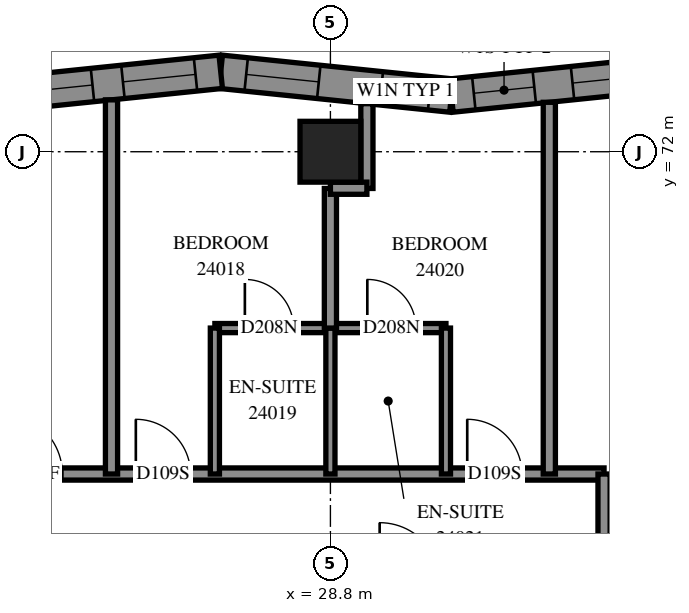
"""IFC4 building model, lengths in metres.
Left out: names, types, materials, properties, quantities, classifications, styles, units other than length and angle.
Written with IfcOpenShell. Run it as: python <this file> out.ifc"""

import sys

from ifc_helpers import new_model, si_unit, direction, frame, frame_2d, origin, origin_2d, place, context, subcontext, project, spatial, polyline, rectangle, outline, extrude, element, fill, save


model = new_model("IFC4")
c1 = context("Model", 3, precision=1e-05, world=origin(), true_north=direction((0.0, 1.0)))
c2 = subcontext(c1, "Body", "Model", "MODEL_VIEW")
j1 = project(units=[si_unit("LENGTHUNIT", "METRE"), si_unit("PLANEANGLEUNIT", "RADIAN")], contexts=[c1])
p1 = place(None, origin())
s1 = spatial("IfcSite", under=j1, at=p1, CompositionType="ELEMENT")
p2 = place(p1, origin())
s2 = spatial("IfcBuilding", under=s1, at=p2, CompositionType="ELEMENT")
p3 = place(p2, frame((0.0, 0.0, 91.4)))
s3 = spatial("IfcBuildingStorey", under=s2, at=p3, CompositionType="ELEMENT", Elevation=91.4)
p4 = place(p3, frame((28.8, 72.0, 0.0), z_axis=(0.0, 0.0, 1.0), x_axis=(1.0, 0.0, 0.0)))
e1 = element("IfcColumn", 1, at=p4, inside=s3, PredefinedType="COLUMN", context=c2, shape_type="SweptSolid", body=[
    extrude(rectangle(XDim=1.0, YDim=1.0, at=origin_2d()), origin(), (0.0, 0.0, 1.0), 3.1),
])
p5 = place(p3, frame((34.584, 73.314, 0.0), z_axis=(0.0, 0.0, 1.0), x_axis=(-0.9947304076, -0.1025251975, 0.0)))
e2 = element("IfcWall", 2, at=p5, inside=s3, PredefinedType="SOLIDWALL", context=c2, shape_type="SweptSolid", body=[
    extrude(outline(polyline([(-0.028, -0.275), (3.785, -0.275), (3.842, 0.275), (0.028, 0.275), (-0.028, -0.275)])), origin(), (0.0, 0.0, 1.0), 3.1),
])
p6 = place(p5, frame((0.612, 0.0, 0.5)))
e3 = element("IfcOpeningElement", 3, at=p6, cuts=e2, PredefinedType="OPENING", context=c2, shape_type="SweptSolid", body=[
    extrude(rectangle(XDim=1.2, YDim=2.45, at=frame_2d((0.6, 1.225))), frame((0.0, 0.285, 0.0), z_axis=(0.0, -1.0, 0.0), x_axis=(1.0, 0.0, 0.0)), (0.0, 0.0, 1.0), 0.57),
])
p7 = place(p5, frame((2.444, 0.0, 0.45)))
e4 = element("IfcOpeningElement", 4, at=p7, cuts=e2, PredefinedType="OPENING", context=c2, shape_type="SweptSolid", body=[
    extrude(rectangle(XDim=1.0, YDim=2.5, at=frame_2d((0.5, 1.25))), frame((0.0, 0.285, 0.0), z_axis=(0.0, -1.0, 0.0), x_axis=(1.0, 0.0, 0.0)), (0.0, 0.0, 1.0), 0.57),
])
p8 = place(p3, frame((30.79, 72.924, 0.0), z_axis=(0.0, 0.0, 1.0), x_axis=(-0.9947306832, 0.1025225234, 0.0)))
e5 = element("IfcWall", 5, at=p8, inside=s3, PredefinedType="SOLIDWALL", context=c2, shape_type="SweptSolid", body=[
    extrude(outline(polyline([(0.028, -0.275), (3.842, -0.275), (3.785, 0.275), (-0.028, 0.275), (0.028, -0.275)])), origin(), (0.0, 0.0, 1.0), 3.1),
])
p9 = place(p8, frame((2.193, 0.0, 0.5)))
e6 = element("IfcOpeningElement", 6, at=p9, cuts=e5, PredefinedType="OPENING", context=c2, shape_type="SweptSolid", body=[
    extrude(rectangle(XDim=1.2, YDim=2.45, at=frame_2d((0.6, 1.225))), frame((0.0, 0.285, 0.0), z_axis=(0.0, -1.0, 0.0), x_axis=(1.0, 0.0, 0.0)), (0.0, 0.0, 1.0), 0.57),
])
p10 = place(p8, frame((0.359, 0.0, 0.45)))
e7 = element("IfcOpeningElement", 7, at=p10, cuts=e5, PredefinedType="OPENING", context=c2, shape_type="SweptSolid", body=[
    extrude(rectangle(XDim=0.8, YDim=2.5, at=frame_2d((0.4, 1.25))), frame((0.0, 0.285, 0.0), z_axis=(0.0, -1.0, 0.0), x_axis=(1.0, 0.0, 0.0)), (0.0, 0.0, 1.0), 0.57),
])
p11 = place(p3, frame((26.996, 73.314, 0.0), z_axis=(0.0, 0.0, 1.0), x_axis=(-0.9947305582, -0.1025237367, 0.0)))
e8 = element("IfcWall", 8, at=p11, inside=s3, PredefinedType="SOLIDWALL", context=c2, shape_type="SweptSolid", body=[
    extrude(outline(polyline([(-0.028, -0.275), (3.785, -0.275), (3.885, 0.275), (0.028, 0.275), (-0.028, -0.275)])), origin(), (0.0, 0.0, 1.0), 3.1),
])
p12 = place(p11, frame((0.417, 0.0, 0.5)))
e9 = element("IfcOpeningElement", 9, at=p12, cuts=e8, PredefinedType="OPENING", context=c2, shape_type="SweptSolid", body=[
    extrude(rectangle(XDim=1.2, YDim=2.45, at=frame_2d((0.6, 1.225))), frame((0.0, 0.285, 0.0), z_axis=(0.0, -1.0, 0.0), x_axis=(1.0, 0.0, 0.0)), (0.0, 0.0, 1.0), 0.57),
])
p13 = place(p11, frame((2.12, 0.0, 0.5)))
e10 = element("IfcOpeningElement", 10, at=p13, cuts=e8, PredefinedType="OPENING", context=c2, shape_type="SweptSolid", body=[
    extrude(rectangle(XDim=1.2, YDim=2.45, at=frame_2d((0.6, 1.225))), frame((0.0, 0.285, 0.0), z_axis=(0.0, -1.0, 0.0), x_axis=(1.0, 0.0, 0.0)), (0.0, 0.0, 1.0), 0.57),
])
p14 = place(p3, frame((21.602, 66.7, 0.0), z_axis=(0.0, 0.0, 1.0), x_axis=(1.0, 0.0, 0.0)))
e11 = element("IfcWall", 11, at=p14, inside=s3, PredefinedType="PARTITIONING", context=c2, shape_type="SweptSolid", body=[
    extrude(rectangle(XDim=11.698, YDim=0.2, at=frame_2d((5.849, 0.0))), origin(), (0.0, 0.0, 1.0), 3.1),
])
p15 = place(p14, frame((1.79, 0.0, 0.0)))
e12 = element("IfcOpeningElement", 12, at=p15, cuts=e11, PredefinedType="OPENING", context=c2, shape_type="SweptSolid", body=[
    extrude(rectangle(XDim=1.0, YDim=2.1, at=frame_2d((0.5, 1.05))), frame((0.0, 0.11, 0.0), z_axis=(0.0, -1.0, 0.0), x_axis=(1.0, 0.0, 0.0)), (0.0, 0.0, 1.0), 0.22),
])
p16 = place(p14, frame((3.998, 0.0, 0.0)))
e13 = element("IfcOpeningElement", 13, at=p16, cuts=e11, PredefinedType="OPENING", context=c2, shape_type="SweptSolid", body=[
    extrude(rectangle(XDim=0.9, YDim=2.1, at=frame_2d((0.45, 1.05))), frame((0.0, 0.11, 0.0), z_axis=(0.0, -1.0, 0.0), x_axis=(1.0, 0.0, 0.0)), (0.0, 0.0, 1.0), 0.22),
])
p17 = place(p14, frame((9.448, 0.0, 0.0)))
e14 = element("IfcOpeningElement", 14, at=p17, cuts=e11, PredefinedType="OPENING", context=c2, shape_type="SweptSolid", body=[
    extrude(rectangle(XDim=0.9, YDim=2.1, at=frame_2d((0.45, 1.05))), frame((0.0, 0.11, 0.0), z_axis=(0.0, -1.0, 0.0), x_axis=(1.0, 0.0, 0.0)), (0.0, 0.0, 1.0), 0.22),
])
p18 = place(p3, frame((25.2, 66.7, 0.0), z_axis=(0.0, 0.0, 1.0), x_axis=(0.0, 1.0, 0.0)))
e15 = element("IfcWall", 15, at=p18, inside=s3, PredefinedType="PARTITIONING", context=c2, shape_type="SweptSolid", body=[
    extrude(rectangle(XDim=6.153, YDim=0.2, at=frame_2d((3.076, 0.0))), origin(), (0.0, 0.0, 1.0), 3.1),
])
p19 = place(p3, frame((32.4, 66.7, 0.0), z_axis=(0.0, 0.0, 1.0), x_axis=(0.0, 1.0, 0.0)))
e16 = element("IfcWall", 16, at=p19, inside=s3, PredefinedType="PARTITIONING", context=c2, shape_type="SweptSolid", body=[
    extrude(rectangle(XDim=6.113, YDim=0.2, at=frame_2d((3.057, 0.0))), origin(), (0.0, 0.0, 1.0), 3.1),
])
p20 = place(p3, frame((33.3, 62.102, 0.0), z_axis=(0.0, 0.0, 1.0), x_axis=(0.0, 1.0, 0.0)))
e17 = element("IfcWall", 17, at=p20, inside=s3, PredefinedType="PARTITIONING", context=c2, shape_type="SweptSolid", body=[
    extrude(rectangle(XDim=4.598, YDim=0.2, at=frame_2d((2.299, 0.0))), origin(), (0.0, 0.0, 1.0), 3.1),
])
p21 = place(p20, frame((2.501, 0.0, 0.0)))
e18 = element("IfcOpeningElement", 18, at=p21, cuts=e17, PredefinedType="OPENING", context=c2, shape_type="SweptSolid", body=[
    extrude(rectangle(XDim=0.9, YDim=2.1, at=frame_2d((0.45, 1.05))), frame((0.0, 0.11, 0.0), z_axis=(0.0, -1.0, 0.0), x_axis=(1.0, 0.0, 0.0)), (0.0, 0.0, 1.0), 0.22),
])
p22 = place(p3, frame((26.9, 69.1, 0.0), z_axis=(0.0, 0.0, 1.0), x_axis=(1.0, 0.0, 0.0)))
e19 = element("IfcWall", 19, at=p22, inside=s3, PredefinedType="PARTITIONING", context=c2, shape_type="SweptSolid", body=[
    extrude(rectangle(XDim=3.8, YDim=0.15, at=frame_2d((1.9, 0.0))), origin(), (0.0, 0.0, 1.0), 3.1),
])
p23 = place(p22, frame((0.493, 0.0, 0.0)))
e20 = element("IfcOpeningElement", 20, at=p23, cuts=e19, PredefinedType="OPENING", context=c2, shape_type="SweptSolid", body=[
    extrude(rectangle(XDim=0.8, YDim=2.1, at=frame_2d((0.4, 1.05))), frame((0.0, 0.085, 0.0), z_axis=(0.0, -1.0, 0.0), x_axis=(1.0, 0.0, 0.0)), (0.0, 0.0, 1.0), 0.17),
])
p24 = place(p22, frame((2.507, 0.0, 0.0)))
e21 = element("IfcOpeningElement", 21, at=p24, cuts=e19, PredefinedType="OPENING", context=c2, shape_type="SweptSolid", body=[
    extrude(rectangle(XDim=0.8, YDim=2.1, at=frame_2d((0.4, 1.05))), frame((0.0, 0.085, 0.0), z_axis=(0.0, -1.0, 0.0), x_axis=(1.0, 0.0, 0.0)), (0.0, 0.0, 1.0), 0.17),
])
for number, where, z_axis, x_axis in (
    (22, (26.9, 66.7, 0.0), (0.0, 0.0, 1.0), (0.0, 1.0, 0.0)),
    (23, (28.8, 66.7, 0.0), (0.0, 0.0, 1.0), (0.0, 1.0, 0.0)),
    (24, (30.7, 66.7, 0.0), (0.0, 0.0, 1.0), (0.0, 1.0, 0.0)),
):
    element("IfcWall", number, at=place(p3, frame(where, z_axis=z_axis, x_axis=x_axis)), inside=s3, PredefinedType="PARTITIONING", context=c2, shape_type="SweptSolid", body=[
        extrude(rectangle(XDim=2.4, YDim=0.15, at=frame_2d((1.2, 0.0))), origin(), (0.0, 0.0, 1.0), 3.1),
    ])
p25 = place(p3, frame((28.8, 69.1, 0.0), z_axis=(0.0, 0.0, 1.0), x_axis=(0.0, 1.0, 0.0)))
e25 = element("IfcWall", 25, at=p25, inside=s3, PredefinedType="PARTITIONING", context=c2, shape_type="SweptSolid", body=[
    extrude(rectangle(XDim=2.296, YDim=0.2, at=frame_2d((1.148, 0.0))), origin(), (0.0, 0.0, 1.0), 3.1),
])
p26 = place(p3, frame((29.4, 71.396, 0.0), z_axis=(0.0, 0.0, 1.0), x_axis=(0.0, 1.0, 0.0)))
e26 = element("IfcWall", 26, at=p26, inside=s3, PredefinedType="PARTITIONING", context=c2, shape_type="SweptSolid", body=[
    extrude(rectangle(XDim=1.394, YDim=0.2, at=frame_2d((0.697, 0.0))), origin(), (0.0, 0.0, 1.0), 3.1),
])
p27 = place(p3, frame((28.8, 71.4, 0.0), z_axis=(0.0, 0.0, 1.0), x_axis=(1.0, 0.0, 0.0)))
e27 = element("IfcWall", 27, at=p27, inside=s3, PredefinedType="PARTITIONING", context=c2, shape_type="SweptSolid", body=[
    extrude(rectangle(XDim=0.6, YDim=0.2, at=frame_2d((0.3, 0.0))), origin(), (0.0, 0.0, 1.0), 3.1),
])
p28 = place(p6, origin())
e28 = element("IfcWindow", 28, at=p28, inside=s3, PartitioningType="SINGLE_PANEL", PredefinedType="WINDOW", context=c2, shape_type="SweptSolid", body=[
    extrude(rectangle(XDim=1.2, YDim=2.45, at=frame_2d((0.6, 1.225))), frame((0.0, 0.155, 0.0), z_axis=(0.0, -1.0, 0.0), x_axis=(1.0, 0.0, 0.0)), (0.0, 0.0, 1.0), 0.06),
])
fill(e3, e28)
p29 = place(p9, origin())
e29 = element("IfcWindow", 29, at=p29, inside=s3, PartitioningType="SINGLE_PANEL", PredefinedType="WINDOW", context=c2, shape_type="SweptSolid", body=[
    extrude(rectangle(XDim=1.2, YDim=2.45, at=frame_2d((0.6, 1.225))), frame((0.0, 0.155, 0.0), z_axis=(0.0, -1.0, 0.0), x_axis=(1.0, 0.0, 0.0)), (0.0, 0.0, 1.0), 0.06),
])
fill(e6, e29)
p30 = place(p12, origin())
e30 = element("IfcWindow", 30, at=p30, inside=s3, PartitioningType="SINGLE_PANEL", PredefinedType="WINDOW", context=c2, shape_type="SweptSolid", body=[
    extrude(rectangle(XDim=1.2, YDim=2.45, at=frame_2d((0.6, 1.225))), frame((0.0, 0.155, 0.0), z_axis=(0.0, -1.0, 0.0), x_axis=(1.0, 0.0, 0.0)), (0.0, 0.0, 1.0), 0.06),
])
fill(e9, e30)
p31 = place(p13, origin())
e31 = element("IfcWindow", 31, at=p31, inside=s3, PartitioningType="SINGLE_PANEL", PredefinedType="WINDOW", context=c2, shape_type="SweptSolid", body=[
    extrude(rectangle(XDim=1.2, YDim=2.45, at=frame_2d((0.6, 1.225))), frame((0.0, 0.155, 0.0), z_axis=(0.0, -1.0, 0.0), x_axis=(1.0, 0.0, 0.0)), (0.0, 0.0, 1.0), 0.06),
])
fill(e10, e31)
p32 = place(p15, origin())
e32 = element("IfcDoor", 32, at=p32, inside=s3, OperationType="SINGLE_SWING_RIGHT", PredefinedType="DOOR", context=c2, shape_type="SweptSolid", body=[
    extrude(rectangle(XDim=1.0, YDim=2.1, at=frame_2d((0.5, 1.05))), frame((0.0, 0.025, 0.0), z_axis=(0.0, -1.0, 0.0), x_axis=(1.0, 0.0, 0.0)), (0.0, 0.0, 1.0), 0.05),
])
fill(e12, e32)
p33 = place(p16, origin())
e33 = element("IfcDoor", 33, at=p33, inside=s3, OperationType="SINGLE_SWING_LEFT", PredefinedType="DOOR", context=c2, shape_type="SweptSolid", body=[
    extrude(rectangle(XDim=0.9, YDim=2.1, at=frame_2d((0.45, 1.05))), frame((0.0, 0.025, 0.0), z_axis=(0.0, -1.0, 0.0), x_axis=(1.0, 0.0, 0.0)), (0.0, 0.0, 1.0), 0.05),
])
fill(e13, e33)
p34 = place(p23, origin())
e34 = element("IfcDoor", 34, at=p34, inside=s3, OperationType="SINGLE_SWING_RIGHT", PredefinedType="DOOR", context=c2, shape_type="SweptSolid", body=[
    extrude(rectangle(XDim=0.8, YDim=2.1, at=frame_2d((0.4, 1.05))), frame((0.0, 0.025, 0.0), z_axis=(0.0, -1.0, 0.0), x_axis=(1.0, 0.0, 0.0)), (0.0, 0.0, 1.0), 0.05),
])
fill(e20, e34)
p35 = place(p17, origin())
e35 = element("IfcDoor", 35, at=p35, inside=s3, OperationType="SINGLE_SWING_RIGHT", PredefinedType="DOOR", context=c2, shape_type="SweptSolid", body=[
    extrude(rectangle(XDim=0.9, YDim=2.1, at=frame_2d((0.45, 1.05))), frame((0.0, 0.025, 0.0), z_axis=(0.0, -1.0, 0.0), x_axis=(1.0, 0.0, 0.0)), (0.0, 0.0, 1.0), 0.05),
])
fill(e14, e35)
p36 = place(p24, origin())
e36 = element("IfcDoor", 36, at=p36, inside=s3, OperationType="SINGLE_SWING_RIGHT", PredefinedType="DOOR", context=c2, shape_type="SweptSolid", body=[
    extrude(rectangle(XDim=0.8, YDim=2.1, at=frame_2d((0.4, 1.05))), frame((0.0, 0.025, 0.0), z_axis=(0.0, -1.0, 0.0), x_axis=(1.0, 0.0, 0.0)), (0.0, 0.0, 1.0), 0.05),
])
fill(e21, e36)
p37 = place(p7, origin())
e37 = element("IfcWindow", 37, at=p37, inside=s3, PartitioningType="SINGLE_PANEL", PredefinedType="WINDOW", context=c2, shape_type="SweptSolid", body=[
    extrude(rectangle(XDim=1.0, YDim=2.5, at=frame_2d((0.5, 1.25))), frame((0.0, 0.155, 0.0), z_axis=(0.0, -1.0, 0.0), x_axis=(1.0, 0.0, 0.0)), (0.0, 0.0, 1.0), 0.06),
])
fill(e4, e37)
p38 = place(p10, origin())
e38 = element("IfcWindow", 38, at=p38, inside=s3, PartitioningType="SINGLE_PANEL", PredefinedType="WINDOW", context=c2, shape_type="SweptSolid", body=[
    extrude(rectangle(XDim=0.8, YDim=2.5, at=frame_2d((0.4, 1.25))), frame((0.0, 0.155, 0.0), z_axis=(0.0, -1.0, 0.0), x_axis=(1.0, 0.0, 0.0)), (0.0, 0.0, 1.0), 0.06),
])
fill(e7, e38)
save(model, sys.argv[1])
